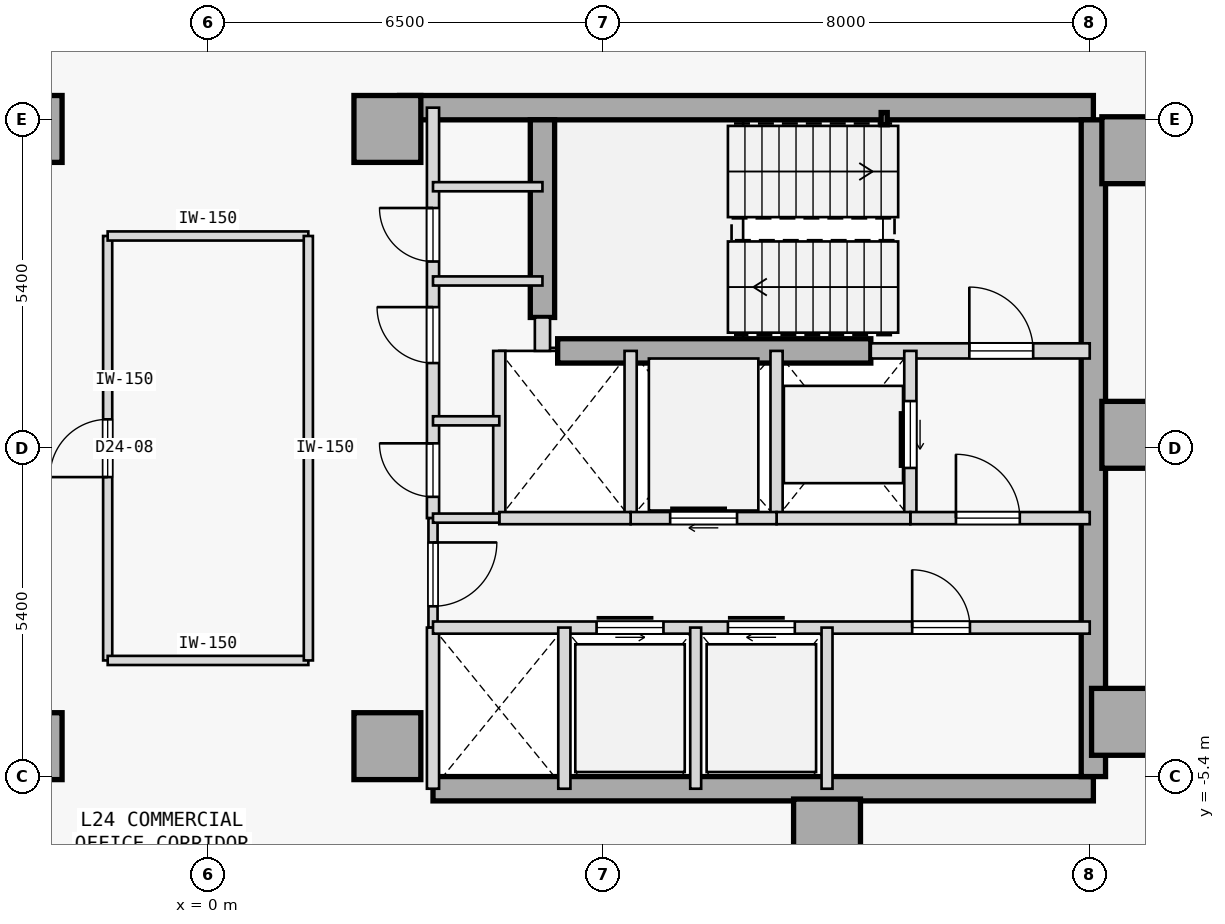
"""IFC4 building model, lengths in metres.
Left out: names, types, materials, properties, quantities, classifications, styles, units other than length and angle.
Written with IfcOpenShell. Run it as: python <this file> out.ifc"""

import sys

from ifc_helpers import new_model, si_unit, direction, frame, frame_2d, origin, origin_2d, place, context, subcontext, project, spatial, rectangle, hollow_rectangle, extrude, element, fill, save


model = new_model("IFC4")
c1 = context("Model", 3, precision=1e-05, world=origin(), true_north=direction((0.0, 1.0)))
c2 = subcontext(c1, "Body", "Model", "MODEL_VIEW")
j1 = project(units=[si_unit("LENGTHUNIT", "METRE"), si_unit("PLANEANGLEUNIT", "RADIAN")], contexts=[c1])
p1 = place(None, origin())
s1 = spatial("IfcSite", under=j1, at=p1, CompositionType="ELEMENT")
p2 = place(p1, origin())
s2 = spatial("IfcBuilding", under=s1, at=p2, CompositionType="ELEMENT")
p3 = place(p2, frame((0.0, 0.0, 98.5)))
s3 = spatial("IfcBuildingStorey", under=s2, at=p3, CompositionType="ELEMENT", Elevation=98.5)
for number, where, z_axis, x_axis in (
    (1, (-2.95, -4.9, 0.0), (0.0, 0.0, 1.0), (1.0, 0.0, 0.0)),
    (2, (-2.95, 5.25, 0.0), (0.0, 0.0, 1.0), (1.0, 0.0, 0.0)),
    (3, (15.25, 4.9, 0.0), (0.0, 0.0, 1.0), (1.0, 0.0, 0.0)),
    (4, (15.25, 0.22, 0.0), (0.0, 0.0, 1.0), (1.0, 0.0, 0.0)),
    (5, (15.08, -4.5, 0.0), (0.0, 0.0, 1.0), (1.0, 0.0, 0.0)),
    (6, (10.18, -6.32, 0.0), (0.0, 0.0, 1.0), (1.0, 0.0, 0.0)),
    (7, (2.95, -4.9, 0.0), (0.0, 0.0, 1.0), (1.0, 0.0, 0.0)),
    (8, (2.95, 5.25, 0.0), (0.0, 0.0, 1.0), (1.0, 0.0, 0.0)),
):
    element("IfcColumn", number, at=place(p3, frame(where, z_axis=z_axis, x_axis=x_axis)), inside=s3, PredefinedType="COLUMN", context=c2, shape_type="SweptSolid", body=[
        extrude(rectangle(XDim=1.1, YDim=1.1, at=origin_2d()), origin(), (0.0, 0.0, 1.0), 3.7),
    ])
p4 = place(p3, frame((3.15, 5.6, 0.0), z_axis=(0.0, 0.0, 1.0), x_axis=(1.0, 0.0, 0.0)))
e9 = element("IfcWall", 9, at=p4, inside=s3, PredefinedType="SHEAR", context=c2, shape_type="SweptSolid", body=[
    extrude(rectangle(XDim=11.41, YDim=0.4, at=frame_2d((5.705, 0.0))), origin(), (0.0, 0.0, 1.0), 3.475),
])
p5 = place(p3, frame((3.7, -5.6, 0.0), z_axis=(0.0, 0.0, 1.0), x_axis=(1.0, 0.0, 0.0)))
e10 = element("IfcWall", 10, at=p5, inside=s3, PredefinedType="SHEAR", context=c2, shape_type="SweptSolid", body=[
    extrude(rectangle(XDim=10.86, YDim=0.4, at=frame_2d((5.43, 0.0))), origin(), (0.0, 0.0, 1.0), 3.475),
])
p6 = place(p3, frame((14.56, -5.4, 0.0), z_axis=(0.0, 0.0, 1.0), x_axis=(0.0, 1.0, 0.0)))
e11 = element("IfcWall", 11, at=p6, inside=s3, PredefinedType="SHEAR", context=c2, shape_type="SweptSolid", body=[
    extrude(rectangle(XDim=10.8, YDim=0.4, at=frame_2d((5.4, 0.0))), origin(), (0.0, 0.0, 1.0), 3.475),
])
p7 = place(p3, frame((5.5, 2.15, 0.0), z_axis=(0.0, 0.0, 1.0), x_axis=(0.0, 1.0, 0.0)))
e12 = element("IfcWall", 12, at=p7, inside=s3, PredefinedType="SHEAR", context=c2, shape_type="SweptSolid", body=[
    extrude(rectangle(XDim=3.25, YDim=0.4, at=frame_2d((1.625, 0.0))), origin(), (0.0, 0.0, 1.0), 3.475),
])
p8 = place(p3, frame((5.75, 1.6, 0.0), z_axis=(0.0, 0.0, 1.0), x_axis=(1.0, 0.0, 0.0)))
e13 = element("IfcWall", 13, at=p8, inside=s3, PredefinedType="SHEAR", context=c2, shape_type="SweptSolid", body=[
    extrude(rectangle(XDim=5.15, YDim=0.4, at=frame_2d((2.575, 0.0))), origin(), (0.0, 0.0, 1.0), 3.475),
])
p9 = place(p3, frame((11.12, 5.42, 0.0), z_axis=(0.0, 0.0, 1.0), x_axis=(1.0, 0.0, 0.0)))
e14 = element("IfcColumn", 14, at=p9, inside=s3, PredefinedType="COLUMN", context=c2, shape_type="SweptSolid", body=[
    extrude(hollow_rectangle(XDim=0.1, YDim=0.2, WallThickness=0.008, at=origin_2d()), origin(), (0.0, 0.0, 1.0), 3.7),
])
p10 = place(p3, frame((10.9, 1.6, 0.0), z_axis=(0.0, 0.0, 1.0), x_axis=(1.0, 0.0, 0.0)))
e15 = element("IfcWall", 15, at=p10, inside=s3, PredefinedType="STANDARD", context=c2, shape_type="SweptSolid", body=[
    extrude(rectangle(XDim=3.6, YDim=0.25, at=frame_2d((1.8, 0.0))), origin(), (0.0, 0.0, 1.0), 3.475),
])
p11 = place(p10, frame((1.62, 0.0, 0.0)))
e16 = element("IfcOpeningElement", 16, at=p11, cuts=e15, PredefinedType="OPENING", context=c2, shape_type="SweptSolid", body=[
    extrude(rectangle(XDim=1.05, YDim=2.15, at=frame_2d((0.525, 1.075))), frame((0.0, 0.135, 0.0), z_axis=(0.0, -1.0, 0.0), x_axis=(1.0, 0.0, 0.0)), (0.0, 0.0, 1.0), 0.27),
])
p12 = place(p3, frame((5.5, 1.6, 0.0), z_axis=(0.0, 0.0, 1.0), x_axis=(0.0, 1.0, 0.0)))
e17 = element("IfcWall", 17, at=p12, inside=s3, PredefinedType="STANDARD", context=c2, shape_type="SweptSolid", body=[
    extrude(rectangle(XDim=0.55, YDim=0.25, at=frame_2d((0.275, 0.0))), origin(), (0.0, 0.0, 1.0), 3.475),
])
p13 = place(p3, frame((3.7, -1.15, 0.0), z_axis=(0.0, 0.0, 1.0), x_axis=(0.0, 1.0, 0.0)))
e18 = element("IfcWall", 18, at=p13, inside=s3, PredefinedType="STANDARD", context=c2, shape_type="SweptSolid", body=[
    extrude(rectangle(XDim=6.75, YDim=0.2, at=frame_2d((3.375, 0.0))), origin(), (0.0, 0.0, 1.0), 3.475),
])
p14 = place(p13, frame((0.35, 0.0, 0.0)))
e19 = element("IfcOpeningElement", 19, at=p14, cuts=e18, PredefinedType="OPENING", context=c2, shape_type="SweptSolid", body=[
    extrude(rectangle(XDim=0.88, YDim=2.15, at=frame_2d((0.44, 1.075))), frame((0.0, 0.11, 0.0), z_axis=(0.0, -1.0, 0.0), x_axis=(1.0, 0.0, 0.0)), (0.0, 0.0, 1.0), 0.22),
])
p15 = place(p13, frame((2.55, 0.0, 0.0)))
e20 = element("IfcOpeningElement", 20, at=p15, cuts=e18, PredefinedType="OPENING", context=c2, shape_type="SweptSolid", body=[
    extrude(rectangle(XDim=0.92, YDim=2.15, at=frame_2d((0.46, 1.075))), frame((0.0, 0.11, 0.0), z_axis=(0.0, -1.0, 0.0), x_axis=(1.0, 0.0, 0.0)), (0.0, 0.0, 1.0), 0.22),
])
p16 = place(p13, frame((4.22, 0.0, 0.0)))
e21 = element("IfcOpeningElement", 21, at=p16, cuts=e18, PredefinedType="OPENING", context=c2, shape_type="SweptSolid", body=[
    extrude(rectangle(XDim=0.88, YDim=2.15, at=frame_2d((0.44, 1.075))), frame((0.0, 0.11, 0.0), z_axis=(0.0, -1.0, 0.0), x_axis=(1.0, 0.0, 0.0)), (0.0, 0.0, 1.0), 0.22),
])
p17 = place(p3, frame((3.7, -2.95, 0.0), z_axis=(0.0, 0.0, 1.0), x_axis=(0.0, 1.0, 0.0)))
e22 = element("IfcWall", 22, at=p17, inside=s3, PredefinedType="PARTITIONING", context=c2, shape_type="SweptSolid", body=[
    extrude(rectangle(XDim=1.8, YDim=0.15, at=frame_2d((0.9, 0.0))), origin(), (0.0, 0.0, 1.0), 3.475),
])
p18 = place(p17, frame((0.35, 0.0, 0.0)))
e23 = element("IfcOpeningElement", 23, at=p18, cuts=e22, PredefinedType="OPENING", context=c2, shape_type="SweptSolid", body=[
    extrude(rectangle(XDim=1.05, YDim=2.18, at=frame_2d((0.525, 1.09))), frame((0.0, 0.085, 0.0), z_axis=(0.0, -1.0, 0.0), x_axis=(1.0, 0.0, 0.0)), (0.0, 0.0, 1.0), 0.17),
])
p19 = place(p3, frame((3.7, -5.6, 0.0), z_axis=(0.0, 0.0, 1.0), x_axis=(0.0, 1.0, 0.0)))
e24 = element("IfcWall", 24, at=p19, inside=s3, PredefinedType="STANDARD", context=c2, shape_type="SweptSolid", body=[
    extrude(rectangle(XDim=2.65, YDim=0.2, at=frame_2d((1.325, 0.0))), origin(), (0.0, 0.0, 1.0), 3.475),
])
p20 = place(p3, frame((11.55, -1.15, 0.0), z_axis=(0.0, 0.0, 1.0), x_axis=(0.0, 1.0, 0.0)))
e25 = element("IfcWall", 25, at=p20, inside=s3, PredefinedType="STANDARD", context=c2, shape_type="SweptSolid", body=[
    extrude(rectangle(XDim=2.75, YDim=0.2, at=frame_2d((1.375, 0.0))), origin(), (0.0, 0.0, 1.0), 3.475),
])
p21 = place(p20, frame((0.825, 0.0, 0.0)))
e26 = element("IfcOpeningElement", 26, at=p21, cuts=e25, PredefinedType="OPENING", context=c2, shape_type="SweptSolid", body=[
    extrude(rectangle(XDim=1.1, YDim=2.15, at=frame_2d((0.55, 1.075))), frame((0.0, 0.11, 0.0), z_axis=(0.0, -1.0, 0.0), x_axis=(1.0, 0.0, 0.0)), (0.0, 0.0, 1.0), 0.22),
])
p22 = place(p3, frame((9.35, -1.15, 0.0), z_axis=(0.0, 0.0, 1.0), x_axis=(0.0, 1.0, 0.0)))
e27 = element("IfcWall", 27, at=p22, inside=s3, PredefinedType="STANDARD", context=c2, shape_type="SweptSolid", body=[
    extrude(rectangle(XDim=2.75, YDim=0.2, at=frame_2d((1.375, 0.0))), origin(), (0.0, 0.0, 1.0), 3.475),
])
p23 = place(p3, frame((11.55, -1.15, 0.0), z_axis=(0.0, 0.0, 1.0), x_axis=(1.0, 0.0, 0.0)))
e28 = element("IfcWall", 28, at=p23, inside=s3, PredefinedType="STANDARD", context=c2, shape_type="SweptSolid", body=[
    extrude(rectangle(XDim=2.95, YDim=0.2, at=frame_2d((1.475, 0.0))), origin(), (0.0, 0.0, 1.0), 3.475),
])
p24 = place(p23, frame((0.75, 0.0, 0.0)))
e29 = element("IfcOpeningElement", 29, at=p24, cuts=e28, PredefinedType="OPENING", context=c2, shape_type="SweptSolid", body=[
    extrude(rectangle(XDim=1.05, YDim=2.18, at=frame_2d((0.525, 1.09))), frame((0.0, 0.11, 0.0), z_axis=(0.0, -1.0, 0.0), x_axis=(1.0, 0.0, 0.0)), (0.0, 0.0, 1.0), 0.22),
])
p25 = place(p3, frame((9.35, -1.15, 0.0), z_axis=(0.0, 0.0, 1.0), x_axis=(1.0, 0.0, 0.0)))
e30 = element("IfcWall", 30, at=p25, inside=s3, PredefinedType="STANDARD", context=c2, shape_type="SweptSolid", body=[
    extrude(rectangle(XDim=2.2, YDim=0.2, at=frame_2d((1.1, 0.0))), origin(), (0.0, 0.0, 1.0), 3.475),
])
p26 = place(p3, frame((6.95, -1.15, 0.0), z_axis=(0.0, 0.0, 1.0), x_axis=(0.0, 1.0, 0.0)))
e31 = element("IfcWall", 31, at=p26, inside=s3, PredefinedType="STANDARD", context=c2, shape_type="SweptSolid", body=[
    extrude(rectangle(XDim=2.75, YDim=0.2, at=frame_2d((1.375, 0.0))), origin(), (0.0, 0.0, 1.0), 3.475),
])
p27 = place(p3, frame((6.95, -1.15, 0.0), z_axis=(0.0, 0.0, 1.0), x_axis=(1.0, 0.0, 0.0)))
e32 = element("IfcWall", 32, at=p27, inside=s3, PredefinedType="STANDARD", context=c2, shape_type="SweptSolid", body=[
    extrude(rectangle(XDim=2.4, YDim=0.2, at=frame_2d((1.2, 0.0))), origin(), (0.0, 0.0, 1.0), 3.475),
])
p28 = place(p27, frame((0.65, 0.0, 0.0)))
e33 = element("IfcOpeningElement", 33, at=p28, cuts=e32, PredefinedType="OPENING", context=c2, shape_type="SweptSolid", body=[
    extrude(rectangle(XDim=1.1, YDim=2.15, at=frame_2d((0.55, 1.075))), frame((0.0, 0.11, 0.0), z_axis=(0.0, -1.0, 0.0), x_axis=(1.0, 0.0, 0.0)), (0.0, 0.0, 1.0), 0.22),
])
p29 = place(p3, frame((4.79, -1.15, 0.0), z_axis=(0.0, 0.0, 1.0), x_axis=(0.0, 1.0, 0.0)))
e34 = element("IfcWall", 34, at=p29, inside=s3, PredefinedType="STANDARD", context=c2, shape_type="SweptSolid", body=[
    extrude(rectangle(XDim=2.75, YDim=0.2, at=frame_2d((1.375, 0.0))), origin(), (0.0, 0.0, 1.0), 3.475),
])
p30 = place(p3, frame((4.79, -1.15, 0.0), z_axis=(0.0, 0.0, 1.0), x_axis=(1.0, 0.0, 0.0)))
e35 = element("IfcWall", 35, at=p30, inside=s3, PredefinedType="STANDARD", context=c2, shape_type="SweptSolid", body=[
    extrude(rectangle(XDim=2.16, YDim=0.2, at=frame_2d((1.08, 0.0))), origin(), (0.0, 0.0, 1.0), 3.475),
])
p31 = place(p3, frame((3.7, -1.15, 0.0), z_axis=(0.0, 0.0, 1.0), x_axis=(1.0, 0.0, 0.0)))
e36 = element("IfcWall", 36, at=p31, inside=s3, PredefinedType="PARTITIONING", context=c2, shape_type="SweptSolid", body=[
    extrude(rectangle(XDim=1.09, YDim=0.15, at=frame_2d((0.545, 0.0))), origin(), (0.0, 0.0, 1.0), 3.475),
])
p32 = place(p3, frame((3.7, -2.95, 0.0), z_axis=(0.0, 0.0, 1.0), x_axis=(1.0, 0.0, 0.0)))
e37 = element("IfcWall", 37, at=p32, inside=s3, PredefinedType="STANDARD", context=c2, shape_type="SweptSolid", body=[
    extrude(rectangle(XDim=10.8, YDim=0.2, at=frame_2d((5.4, 0.0))), origin(), (0.0, 0.0, 1.0), 3.475),
])
p33 = place(p32, frame((2.69, 0.0, 0.0)))
e38 = element("IfcOpeningElement", 38, at=p33, cuts=e37, PredefinedType="OPENING", context=c2, shape_type="SweptSolid", body=[
    extrude(rectangle(XDim=1.1, YDim=2.15, at=frame_2d((0.55, 1.075))), frame((0.0, 0.11, 0.0), z_axis=(0.0, -1.0, 0.0), x_axis=(1.0, 0.0, 0.0)), (0.0, 0.0, 1.0), 0.22),
])
p34 = place(p32, frame((4.85, 0.0, 0.0)))
e39 = element("IfcOpeningElement", 39, at=p34, cuts=e37, PredefinedType="OPENING", context=c2, shape_type="SweptSolid", body=[
    extrude(rectangle(XDim=1.1, YDim=2.15, at=frame_2d((0.55, 1.075))), frame((0.0, 0.11, 0.0), z_axis=(0.0, -1.0, 0.0), x_axis=(1.0, 0.0, 0.0)), (0.0, 0.0, 1.0), 0.22),
])
p35 = place(p32, frame((7.88, 0.0, 0.0)))
e40 = element("IfcOpeningElement", 40, at=p35, cuts=e37, PredefinedType="OPENING", context=c2, shape_type="SweptSolid", body=[
    extrude(rectangle(XDim=0.95, YDim=2.15, at=frame_2d((0.475, 1.075))), frame((0.0, 0.11, 0.0), z_axis=(0.0, -1.0, 0.0), x_axis=(1.0, 0.0, 0.0)), (0.0, 0.0, 1.0), 0.22),
])
p36 = place(p3, frame((5.86, -5.6, 0.0), z_axis=(0.0, 0.0, 1.0), x_axis=(0.0, 1.0, 0.0)))
e41 = element("IfcWall", 41, at=p36, inside=s3, PredefinedType="STANDARD", context=c2, shape_type="SweptSolid", body=[
    extrude(rectangle(XDim=2.65, YDim=0.2, at=frame_2d((1.325, 0.0))), origin(), (0.0, 0.0, 1.0), 3.475),
])
for number, where, z_axis, x_axis in (
    (42, (10.18, -5.6, 0.0), (0.0, 0.0, 1.0), (0.0, 1.0, 0.0)),
    (43, (8.02, -5.6, 0.0), (0.0, 0.0, 1.0), (0.0, 1.0, 0.0)),
):
    element("IfcWall", number, at=place(p3, frame(where, z_axis=z_axis, x_axis=x_axis)), inside=s3, PredefinedType="STANDARD", context=c2, shape_type="SweptSolid", body=[
        extrude(rectangle(XDim=2.65, YDim=0.18, at=frame_2d((1.325, 0.0))), origin(), (0.0, 0.0, 1.0), 3.475),
    ])
p37 = place(p3, frame((3.7, 4.3, 0.0), z_axis=(0.0, 0.0, 1.0), x_axis=(1.0, 0.0, 0.0)))
e44 = element("IfcWall", 44, at=p37, inside=s3, PredefinedType="PARTITIONING", context=c2, shape_type="SweptSolid", body=[
    extrude(rectangle(XDim=1.8, YDim=0.15, at=frame_2d((0.9, 0.0))), origin(), (0.0, 0.0, 1.0), 3.475),
])
p38 = place(p3, frame((3.7, 0.45, 0.0), z_axis=(0.0, 0.0, 1.0), x_axis=(1.0, 0.0, 0.0)))
e45 = element("IfcWall", 45, at=p38, inside=s3, PredefinedType="PARTITIONING", context=c2, shape_type="SweptSolid", body=[
    extrude(rectangle(XDim=1.09, YDim=0.15, at=frame_2d((0.545, 0.0))), origin(), (0.0, 0.0, 1.0), 3.475),
])
p39 = place(p3, frame((3.7, 2.75, 0.0), z_axis=(0.0, 0.0, 1.0), x_axis=(1.0, 0.0, 0.0)))
e46 = element("IfcWall", 46, at=p39, inside=s3, PredefinedType="PARTITIONING", context=c2, shape_type="SweptSolid", body=[
    extrude(rectangle(XDim=1.8, YDim=0.15, at=frame_2d((0.9, 0.0))), origin(), (0.0, 0.0, 1.0), 3.475),
])
p40 = place(p3, frame((-1.65, -3.49, 0.0), z_axis=(0.0, 0.0, 1.0), x_axis=(-0.000104928124, 0.999999994495, 0.0)))
e47 = element("IfcWall", 47, at=p40, inside=s3, PredefinedType="PARTITIONING", context=c2, shape_type="SweptSolid", body=[
    extrude(rectangle(XDim=6.98, YDim=0.15, at=frame_2d((3.49, 0.0))), origin(), (0.0, 0.0, 1.0), 3.475),
])
p41 = place(p40, frame((3.015, 0.0, 0.0)))
e48 = element("IfcOpeningElement", 48, at=p41, cuts=e47, PredefinedType="OPENING", context=c2, shape_type="SweptSolid", body=[
    extrude(rectangle(XDim=0.95, YDim=2.15, at=frame_2d((0.475, 1.075))), frame((0.0, 0.085, 0.0), z_axis=(0.0, -1.0, 0.0), x_axis=(1.0, 0.0, 0.0)), (0.0, 0.0, 1.0), 0.17),
])
p42 = place(p3, frame((-1.65, -3.49, 0.0), z_axis=(0.0, 0.0, 1.0), x_axis=(1.0, 0.0, 0.0)))
e49 = element("IfcWall", 49, at=p42, inside=s3, PredefinedType="PARTITIONING", context=c2, shape_type="SweptSolid", body=[
    extrude(rectangle(XDim=3.3, YDim=0.15, at=frame_2d((1.65, 0.0))), origin(), (0.0, 0.0, 1.0), 3.475),
])
p43 = place(p3, frame((-1.65, 3.49, 0.0), z_axis=(0.0, 0.0, 1.0), x_axis=(1.0, 0.0, 0.0)))
e50 = element("IfcWall", 50, at=p43, inside=s3, PredefinedType="PARTITIONING", context=c2, shape_type="SweptSolid", body=[
    extrude(rectangle(XDim=3.3, YDim=0.15, at=frame_2d((1.65, 0.0))), origin(), (0.0, 0.0, 1.0), 3.475),
])
p44 = place(p3, frame((1.65, -3.49, 0.0), z_axis=(0.0, 0.0, 1.0), x_axis=(-6.9952083e-05, 0.999999997553, 0.0)))
e51 = element("IfcWall", 51, at=p44, inside=s3, PredefinedType="PARTITIONING", context=c2, shape_type="SweptSolid", body=[
    extrude(rectangle(XDim=6.98, YDim=0.15, at=frame_2d((3.49, 0.0))), origin(), (0.0, 0.0, 1.0), 3.475),
])
p45 = place(p11, origin())
e52 = element("IfcDoor", 52, at=p45, inside=s3, OperationType="SINGLE_SWING_LEFT", PredefinedType="DOOR", context=c2, shape_type="SweptSolid", body=[
    extrude(rectangle(XDim=1.05, YDim=2.15, at=frame_2d((0.525, 1.075))), frame((0.0, 0.025, 0.0), z_axis=(0.0, -1.0, 0.0), x_axis=(1.0, 0.0, 0.0)), (0.0, 0.0, 1.0), 0.05),
])
fill(e16, e52)
p46 = place(p24, origin())
e53 = element("IfcDoor", 53, at=p46, inside=s3, OperationType="SINGLE_SWING_LEFT", PredefinedType="DOOR", context=c2, shape_type="SweptSolid", body=[
    extrude(rectangle(XDim=1.05, YDim=2.18, at=frame_2d((0.525, 1.09))), frame((0.0, 0.025, 0.0), z_axis=(0.0, -1.0, 0.0), x_axis=(1.0, 0.0, 0.0)), (0.0, 0.0, 1.0), 0.05),
])
fill(e29, e53)
p47 = place(p18, frame((1.05, 0.0, 0.0), z_axis=(0.0, 0.0, 1.0), x_axis=(-1.0, 0.0, 0.0)))
e54 = element("IfcDoor", 54, at=p47, inside=s3, OperationType="SINGLE_SWING_RIGHT", PredefinedType="DOOR", context=c2, shape_type="SweptSolid", body=[
    extrude(rectangle(XDim=1.05, YDim=2.18, at=frame_2d((0.525, 1.09))), frame((0.0, 0.025, 0.0), z_axis=(0.0, -1.0, 0.0), x_axis=(1.0, 0.0, 0.0)), (0.0, 0.0, 1.0), 0.05),
])
fill(e23, e54)
p48 = place(p21, origin())
e55 = element("IfcDoor", 55, at=p48, inside=s3, OperationType="SLIDING_TO_RIGHT", PredefinedType="DOOR", context=c2, shape_type="SweptSolid", body=[
    extrude(rectangle(XDim=1.1, YDim=2.15, at=frame_2d((0.55, 1.075))), frame((0.0, 0.025, 0.0), z_axis=(0.0, -1.0, 0.0), x_axis=(1.0, 0.0, 0.0)), (0.0, 0.0, 1.0), 0.05),
])
fill(e26, e55)
p49 = place(p28, origin())
e56 = element("IfcDoor", 56, at=p49, inside=s3, OperationType="SLIDING_TO_RIGHT", PredefinedType="DOOR", context=c2, shape_type="SweptSolid", body=[
    extrude(rectangle(XDim=1.1, YDim=2.15, at=frame_2d((0.55, 1.075))), frame((0.0, 0.025, 0.0), z_axis=(0.0, -1.0, 0.0), x_axis=(1.0, 0.0, 0.0)), (0.0, 0.0, 1.0), 0.05),
])
fill(e33, e56)
p50 = place(p33, origin())
e57 = element("IfcDoor", 57, at=p50, inside=s3, OperationType="SLIDING_TO_LEFT", PredefinedType="DOOR", context=c2, shape_type="SweptSolid", body=[
    extrude(rectangle(XDim=1.1, YDim=2.15, at=frame_2d((0.55, 1.075))), frame((0.0, 0.025, 0.0), z_axis=(0.0, -1.0, 0.0), x_axis=(1.0, 0.0, 0.0)), (0.0, 0.0, 1.0), 0.05),
])
fill(e38, e57)
p51 = place(p34, origin())
e58 = element("IfcDoor", 58, at=p51, inside=s3, OperationType="SLIDING_TO_RIGHT", PredefinedType="DOOR", context=c2, shape_type="SweptSolid", body=[
    extrude(rectangle(XDim=1.1, YDim=2.15, at=frame_2d((0.55, 1.075))), frame((0.0, 0.025, 0.0), z_axis=(0.0, -1.0, 0.0), x_axis=(1.0, 0.0, 0.0)), (0.0, 0.0, 1.0), 0.05),
])
fill(e39, e58)
p52 = place(p35, origin())
e59 = element("IfcDoor", 59, at=p52, inside=s3, OperationType="SINGLE_SWING_LEFT", PredefinedType="DOOR", context=c2, shape_type="SweptSolid", body=[
    extrude(rectangle(XDim=0.95, YDim=2.15, at=frame_2d((0.475, 1.075))), frame((0.0, 0.025, 0.0), z_axis=(0.0, -1.0, 0.0), x_axis=(1.0, 0.0, 0.0)), (0.0, 0.0, 1.0), 0.05),
])
fill(e40, e59)
p53 = place(p14, origin())
e60 = element("IfcDoor", 60, at=p53, inside=s3, OperationType="SINGLE_SWING_RIGHT", PredefinedType="DOOR", context=c2, shape_type="SweptSolid", body=[
    extrude(rectangle(XDim=0.88, YDim=2.15, at=frame_2d((0.44, 1.075))), frame((0.0, 0.025, 0.0), z_axis=(0.0, -1.0, 0.0), x_axis=(1.0, 0.0, 0.0)), (0.0, 0.0, 1.0), 0.05),
])
fill(e19, e60)
p54 = place(p15, origin())
e61 = element("IfcDoor", 61, at=p54, inside=s3, OperationType="SINGLE_SWING_RIGHT", PredefinedType="DOOR", context=c2, shape_type="SweptSolid", body=[
    extrude(rectangle(XDim=0.92, YDim=2.15, at=frame_2d((0.46, 1.075))), frame((0.0, 0.025, 0.0), z_axis=(0.0, -1.0, 0.0), x_axis=(1.0, 0.0, 0.0)), (0.0, 0.0, 1.0), 0.05),
])
fill(e20, e61)
p55 = place(p16, origin())
e62 = element("IfcDoor", 62, at=p55, inside=s3, OperationType="SINGLE_SWING_RIGHT", PredefinedType="DOOR", context=c2, shape_type="SweptSolid", body=[
    extrude(rectangle(XDim=0.88, YDim=2.15, at=frame_2d((0.44, 1.075))), frame((0.0, 0.025, 0.0), z_axis=(0.0, -1.0, 0.0), x_axis=(1.0, 0.0, 0.0)), (0.0, 0.0, 1.0), 0.05),
])
fill(e21, e62)
p56 = place(p41, origin())
e63 = element("IfcDoor", 63, at=p56, inside=s3, OperationType="SINGLE_SWING_LEFT", PredefinedType="DOOR", context=c2, shape_type="SweptSolid", body=[
    extrude(rectangle(XDim=0.95, YDim=2.15, at=frame_2d((0.475, 1.075))), frame((0.0, 0.025, 0.0), z_axis=(0.0, -1.0, 0.0), x_axis=(1.0, 0.0, 0.0)), (0.0, 0.0, 1.0), 0.05),
])
fill(e48, e63)
save(model, sys.argv[1])
